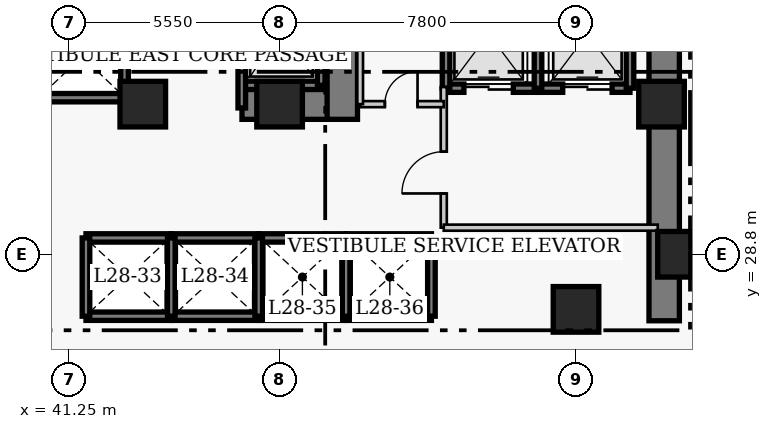
"""IFC4 building model, lengths in metres.
Left out: names, types, materials, properties, quantities, classifications, styles, units other than length and angle.
Written with IfcOpenShell. Run it as: python <this file> out.ifc"""

import sys

from ifc_helpers import new_model, si_unit, direction, frame, frame_2d, origin, origin_2d, place, context, subcontext, project, spatial, rectangle, extrude, element, fill, save


model = new_model("IFC4")
c1 = context("Model", 3, precision=1e-05, world=origin(), true_north=direction((0.0, 1.0)))
c2 = subcontext(c1, "Body", "Model", "MODEL_VIEW")
j1 = project(units=[si_unit("LENGTHUNIT", "METRE"), si_unit("PLANEANGLEUNIT", "RADIAN")], contexts=[c1])
p1 = place(None, origin())
s1 = spatial("IfcSite", under=j1, at=p1, CompositionType="ELEMENT")
p2 = place(p1, origin())
s2 = spatial("IfcBuilding", under=s1, at=p2, CompositionType="ELEMENT")
p3 = place(p2, frame((0.0, 0.0, 114.6)))
s3 = spatial("IfcBuildingStorey", under=s2, at=p3, CompositionType="ELEMENT", Elevation=114.6)
p4 = place(p3, frame((56.92, 27.05, 0.0), z_axis=(0.0, 0.0, 1.0), x_axis=(0.0, 1.0, 0.0)))
e1 = element("IfcWall", 1, at=p4, inside=s3, PredefinedType="SHEAR", context=c2, shape_type="SweptSolid", body=[
    extrude(rectangle(XDim=13.67, YDim=0.8, at=frame_2d((6.835, 0.0))), origin(), (0.0, 0.0, 1.0), 3.8),
])
p5 = place(p3, frame((45.81, 32.75, 0.0), z_axis=(0.0, 0.0, 1.0), x_axis=(1.0, 0.0, 0.0)))
e2 = element("IfcWall", 2, at=p5, inside=s3, PredefinedType="SHEAR", context=c2, shape_type="SweptSolid", body=[
    extrude(rectangle(XDim=2.64, YDim=0.8, at=frame_2d((1.32, 0.0))), origin(), (0.0, 0.0, 1.0), 3.8),
])
p6 = place(p3, frame((48.45, 32.35, 0.0), z_axis=(0.0, 0.0, 1.0), x_axis=(0.0, 1.0, 0.0)))
e3 = element("IfcWall", 3, at=p6, inside=s3, PredefinedType="SHEAR", context=c2, shape_type="SweptSolid", body=[
    extrude(rectangle(XDim=7.97, YDim=0.8, at=frame_2d((3.985, 0.0))), origin(), (0.0, 0.0, 1.0), 3.8),
])
p7 = place(p6, frame((5.85, 0.0, 0.0)))
e4 = element("IfcOpeningElement", 4, at=p7, cuts=e3, PredefinedType="OPENING", context=c2, shape_type="SweptSolid", body=[
    extrude(rectangle(XDim=1.1, YDim=2.15, at=frame_2d((0.55, 1.075))), frame((0.0, 0.41, 0.0), z_axis=(0.0, -1.0, 0.0), x_axis=(1.0, 0.0, 0.0)), (0.0, 0.0, 1.0), 0.82),
])
for number, where, z_axis, x_axis in (
    (5, (57.35, 28.8, 0.0), (0.0, 0.0, 1.0), (1.0, 0.0, 0.0)),
    (6, (43.2, 32.75, 0.0), (0.0, 0.0, 1.0), (1.0, 0.0, 0.0)),
    (7, (46.8, 32.75, 0.0), (0.0, 0.0, 1.0), (1.0, 0.0, 0.0)),
    (8, (54.6, 27.35, 0.0), (0.0, 0.0, 1.0), (1.0, 0.0, 0.0)),
    (9, (56.85, 32.75, 0.0), (0.0, 0.0, 1.0), (1.0, 0.0, 0.0)),
):
    element("IfcColumn", number, at=place(p3, frame(where, z_axis=z_axis, x_axis=x_axis)), inside=s3, PredefinedType="COLUMN", context=c2, shape_type="SweptSolid", body=[
        extrude(rectangle(XDim=1.2, YDim=1.2, at=origin_2d()), origin(), (0.0, 0.0, 1.0), 3.8),
    ])
for number, where, z_axis, x_axis in (
    (10, (41.705, 29.23, 0.0), (0.0, 0.0, 1.0), (1.0, 0.0, 0.0)),
    (11, (41.705, 27.17, 0.0), (0.0, 0.0, 1.0), (1.0, 0.0, 0.0)),
):
    element("IfcWall", number, at=place(p3, frame(where, z_axis=z_axis, x_axis=x_axis)), inside=s3, PredefinedType="SHEAR", context=c2, shape_type="SweptSolid", body=[
        extrude(rectangle(XDim=2.245, YDim=0.22, at=frame_2d((1.123, 0.0))), origin(), (0.0, 0.0, 1.0), 3.8),
    ])
p8 = place(p3, frame((41.705, 27.17, 0.0), z_axis=(0.0, 0.0, 1.0), x_axis=(0.0, 1.0, 0.0)))
e12 = element("IfcWall", 12, at=p8, inside=s3, PredefinedType="SHEAR", context=c2, shape_type="SweptSolid", body=[
    extrude(rectangle(XDim=2.06, YDim=0.2, at=frame_2d((1.03, 0.0))), origin(), (0.0, 0.0, 1.0), 3.8),
])
for number, where, z_axis, x_axis in (
    (13, (43.95, 29.23, 0.0), (0.0, 0.0, 1.0), (1.0, 0.0, 0.0)),
    (14, (43.95, 27.17, 0.0), (0.0, 0.0, 1.0), (1.0, 0.0, 0.0)),
):
    element("IfcWall", number, at=place(p3, frame(where, z_axis=z_axis, x_axis=x_axis)), inside=s3, PredefinedType="SHEAR", context=c2, shape_type="SweptSolid", body=[
        extrude(rectangle(XDim=2.3, YDim=0.22, at=frame_2d((1.15, 0.0))), origin(), (0.0, 0.0, 1.0), 3.8),
    ])
p9 = place(p3, frame((43.95, 27.17, 0.0), z_axis=(0.0, 0.0, 1.0), x_axis=(0.0, 1.0, 0.0)))
e15 = element("IfcWall", 15, at=p9, inside=s3, PredefinedType="SHEAR", context=c2, shape_type="SweptSolid", body=[
    extrude(rectangle(XDim=2.06, YDim=0.2, at=frame_2d((1.03, 0.0))), origin(), (0.0, 0.0, 1.0), 3.8),
])
for number, where, z_axis, x_axis in (
    (16, (46.25, 29.23, 0.0), (0.0, 0.0, 1.0), (1.0, 0.0, 0.0)),
    (17, (46.25, 27.17, 0.0), (0.0, 0.0, 1.0), (1.0, 0.0, 0.0)),
):
    element("IfcWall", number, at=place(p3, frame(where, z_axis=z_axis, x_axis=x_axis)), inside=s3, PredefinedType="SHEAR", context=c2, shape_type="SweptSolid", body=[
        extrude(rectangle(XDim=2.3, YDim=0.22, at=frame_2d((1.15, 0.0))), origin(), (0.0, 0.0, 1.0), 3.8),
    ])
p10 = place(p3, frame((46.25, 27.17, 0.0), z_axis=(0.0, 0.0, 1.0), x_axis=(0.0, 1.0, 0.0)))
e18 = element("IfcWall", 18, at=p10, inside=s3, PredefinedType="SHEAR", context=c2, shape_type="SweptSolid", body=[
    extrude(rectangle(XDim=2.06, YDim=0.2, at=frame_2d((1.03, 0.0))), origin(), (0.0, 0.0, 1.0), 3.8),
])
for number, where, z_axis, x_axis in (
    (19, (48.55, 29.23, 0.0), (0.0, 0.0, 1.0), (1.0, 0.0, 0.0)),
    (20, (48.55, 27.17, 0.0), (0.0, 0.0, 1.0), (1.0, 0.0, 0.0)),
):
    element("IfcWall", number, at=place(p3, frame(where, z_axis=z_axis, x_axis=x_axis)), inside=s3, PredefinedType="SHEAR", context=c2, shape_type="SweptSolid", body=[
        extrude(rectangle(XDim=2.245, YDim=0.22, at=frame_2d((1.123, 0.0))), origin(), (0.0, 0.0, 1.0), 3.8),
    ])
for number, where, z_axis, x_axis in (
    (21, (48.55, 27.17, 0.0), (0.0, 0.0, 1.0), (0.0, 1.0, 0.0)),
    (22, (50.795, 27.17, 0.0), (0.0, 0.0, 1.0), (0.0, 1.0, 0.0)),
):
    element("IfcWall", number, at=place(p3, frame(where, z_axis=z_axis, x_axis=x_axis)), inside=s3, PredefinedType="SHEAR", context=c2, shape_type="SweptSolid", body=[
        extrude(rectangle(XDim=2.06, YDim=0.2, at=frame_2d((1.03, 0.0))), origin(), (0.0, 0.0, 1.0), 3.8),
    ])
p11 = place(p3, frame((40.4, 32.92, 0.0), z_axis=(0.0, 0.0, 1.0), x_axis=(1.0, 0.0, 0.0)))
e23 = element("IfcWall", 23, at=p11, inside=s3, PredefinedType="SHEAR", context=c2, shape_type="SweptSolid", body=[
    extrude(rectangle(XDim=2.32, YDim=0.22, at=frame_2d((1.16, 0.0))), origin(), (0.0, 0.0, 1.0), 3.8),
])
p12 = place(p3, frame((42.72, 32.92, 0.0), z_axis=(0.0, 0.0, 1.0), x_axis=(0.0, 1.0, 0.0)))
e24 = element("IfcWall", 24, at=p12, inside=s3, PredefinedType="SHEAR", context=c2, shape_type="SweptSolid", body=[
    extrude(rectangle(XDim=2.16, YDim=0.2, at=frame_2d((1.08, 0.0))), origin(), (0.0, 0.0, 1.0), 3.8),
])
p13 = place(p3, frame((51.18, 33.17, 0.0), z_axis=(0.0, 0.0, 1.0), x_axis=(1.0, 0.0, 0.0)))
e25 = element("IfcWall", 25, at=p13, inside=s3, PredefinedType="SHEAR", context=c2, shape_type="SweptSolid", body=[
    extrude(rectangle(XDim=2.42, YDim=0.22, at=frame_2d((1.21, 0.0))), origin(), (0.0, 0.0, 1.0), 3.8),
])
p14 = place(p13, frame((0.47, 0.0, 0.0)))
e26 = element("IfcOpeningElement", 26, at=p14, cuts=e25, PredefinedType="OPENING", context=c2, shape_type="SweptSolid", body=[
    extrude(rectangle(XDim=1.3, YDim=2.15, at=frame_2d((0.65, 1.075))), frame((0.0, 0.12, 0.0), z_axis=(0.0, -1.0, 0.0), x_axis=(1.0, 0.0, 0.0)), (0.0, 0.0, 1.0), 0.24),
])
p15 = place(p3, frame((51.18, 33.17, 0.0), z_axis=(0.0, 0.0, 1.0), x_axis=(0.0, 1.0, 0.0)))
e27 = element("IfcWall", 27, at=p15, inside=s3, PredefinedType="SHEAR", context=c2, shape_type="SweptSolid", body=[
    extrude(rectangle(XDim=2.86, YDim=0.2, at=frame_2d((1.43, 0.0))), origin(), (0.0, 0.0, 1.0), 3.8),
])
p16 = place(p3, frame((53.6, 33.17, 0.0), z_axis=(0.0, 0.0, 1.0), x_axis=(1.0, 0.0, 0.0)))
e28 = element("IfcWall", 28, at=p16, inside=s3, PredefinedType="SHEAR", context=c2, shape_type="SweptSolid", body=[
    extrude(rectangle(XDim=2.42, YDim=0.22, at=frame_2d((1.21, 0.0))), origin(), (0.0, 0.0, 1.0), 3.8),
])
p17 = place(p16, frame((0.65, 0.0, 0.0)))
e29 = element("IfcOpeningElement", 29, at=p17, cuts=e28, PredefinedType="OPENING", context=c2, shape_type="SweptSolid", body=[
    extrude(rectangle(XDim=1.3, YDim=2.15, at=frame_2d((0.65, 1.075))), frame((0.0, 0.12, 0.0), z_axis=(0.0, -1.0, 0.0), x_axis=(1.0, 0.0, 0.0)), (0.0, 0.0, 1.0), 0.24),
])
for number, where, z_axis, x_axis in (
    (30, (53.6, 33.17, 0.0), (0.0, 0.0, 1.0), (0.0, 1.0, 0.0)),
    (31, (56.02, 33.17, 0.0), (0.0, 0.0, 1.0), (0.0, 1.0, 0.0)),
):
    element("IfcWall", number, at=place(p3, frame(where, z_axis=z_axis, x_axis=x_axis)), inside=s3, PredefinedType="SHEAR", context=c2, shape_type="SweptSolid", body=[
        extrude(rectangle(XDim=2.86, YDim=0.2, at=frame_2d((1.43, 0.0))), origin(), (0.0, 0.0, 1.0), 3.8),
    ])
p18 = place(p3, frame((45.805, 33.245, 0.0), z_axis=(0.0, 0.0, 1.0), x_axis=(1.0, 0.0, 0.0)))
e32 = element("IfcWall", 32, at=p18, inside=s3, PredefinedType="SHEAR", context=c2, shape_type="SweptSolid", body=[
    extrude(rectangle(XDim=2.09, YDim=0.22, at=frame_2d((1.045, 0.0))), origin(), (0.0, 0.0, 1.0), 3.8),
])
p19 = place(p3, frame((45.805, 32.65, 0.0), z_axis=(0.0, 0.0, 1.0), x_axis=(0.0, 1.0, 0.0)))
e33 = element("IfcWall", 33, at=p19, inside=s3, PredefinedType="SHEAR", context=c2, shape_type="SweptSolid", body=[
    extrude(rectangle(XDim=3.505, YDim=0.2, at=frame_2d((1.752, 0.0))), origin(), (0.0, 0.0, 1.0), 3.8),
])
p20 = place(p3, frame((47.895, 33.245, 0.0), z_axis=(0.0, 0.0, 1.0), x_axis=(0.0, 1.0, 0.0)))
e34 = element("IfcWall", 34, at=p20, inside=s3, PredefinedType="SHEAR", context=c2, shape_type="SweptSolid", body=[
    extrude(rectangle(XDim=2.91, YDim=0.2, at=frame_2d((1.455, 0.0))), origin(), (0.0, 0.0, 1.0), 3.8),
])
p21 = place(p3, frame((51.12, 29.5, 0.0), z_axis=(0.0, 0.0, 1.0), x_axis=(0.0, 1.0, 0.0)))
e35 = element("IfcWall", 35, at=p21, inside=s3, PredefinedType="PARTITIONING", context=c2, shape_type="SweptSolid", body=[
    extrude(rectangle(XDim=3.7, YDim=0.16, at=frame_2d((1.85, 0.0))), origin(), (0.0, 0.0, 1.0), 3.54),
])
p22 = place(p21, frame((0.9, 0.0, 0.0)))
e36 = element("IfcOpeningElement", 36, at=p22, cuts=e35, PredefinedType="OPENING", context=c2, shape_type="SweptSolid", body=[
    extrude(rectangle(XDim=1.1, YDim=2.15, at=frame_2d((0.55, 1.075))), frame((0.0, 0.09, 0.0), z_axis=(0.0, -1.0, 0.0), x_axis=(1.0, 0.0, 0.0)), (0.0, 0.0, 1.0), 0.18),
])
p23 = place(p3, frame((51.12, 29.5, 0.0), z_axis=(0.0, 0.0, 1.0), x_axis=(1.0, 0.0, 0.0)))
e37 = element("IfcWall", 37, at=p23, inside=s3, PredefinedType="PARTITIONING", context=c2, shape_type="SweptSolid", body=[
    extrude(rectangle(XDim=5.63, YDim=0.16, at=frame_2d((2.815, 0.0))), origin(), (0.0, 0.0, 1.0), 3.54),
])
p24 = place(p3, frame((48.92, 32.75, 0.0), z_axis=(0.0, 0.0, 1.0), x_axis=(1.0, 0.0, 0.0)))
e38 = element("IfcWall", 38, at=p24, inside=s3, PredefinedType="PARTITIONING", context=c2, shape_type="SweptSolid", body=[
    extrude(rectangle(XDim=2.2, YDim=0.16, at=frame_2d((1.1, 0.0))), origin(), (0.0, 0.0, 1.0), 3.54),
])
p25 = place(p24, frame((0.65, 0.0, 0.0)))
e39 = element("IfcOpeningElement", 39, at=p25, cuts=e38, PredefinedType="OPENING", context=c2, shape_type="SweptSolid", body=[
    extrude(rectangle(XDim=0.86, YDim=2.05, at=frame_2d((0.43, 1.025))), frame((0.0, 0.09, 0.0), z_axis=(0.0, -1.0, 0.0), x_axis=(1.0, 0.0, 0.0)), (0.0, 0.0, 1.0), 0.18),
])
p26 = place(p3, frame((48.92, 32.75, 0.0), z_axis=(0.0, 0.0, 1.0), x_axis=(0.0, 1.0, 0.0)))
e40 = element("IfcWall", 40, at=p26, inside=s3, PredefinedType="PARTITIONING", context=c2, shape_type="SweptSolid", body=[
    extrude(rectangle(XDim=3.62, YDim=0.15, at=frame_2d((1.81, 0.0))), origin(), (0.0, 0.0, 1.0), 3.54),
])
p27 = place(p14, origin())
e41 = element("IfcDoor", 41, at=p27, inside=s3, OperationType="DOUBLE_DOOR_SLIDING", PredefinedType="DOOR", context=c2, shape_type="SweptSolid", body=[
    extrude(rectangle(XDim=1.3, YDim=2.15, at=frame_2d((0.65, 1.075))), frame((0.0, 0.025, 0.0), z_axis=(0.0, -1.0, 0.0), x_axis=(1.0, 0.0, 0.0)), (0.0, 0.0, 1.0), 0.05),
])
fill(e26, e41)
p28 = place(p17, origin())
e42 = element("IfcDoor", 42, at=p28, inside=s3, OperationType="DOUBLE_DOOR_SLIDING", PredefinedType="DOOR", context=c2, shape_type="SweptSolid", body=[
    extrude(rectangle(XDim=1.3, YDim=2.15, at=frame_2d((0.65, 1.075))), frame((0.0, 0.025, 0.0), z_axis=(0.0, -1.0, 0.0), x_axis=(1.0, 0.0, 0.0)), (0.0, 0.0, 1.0), 0.05),
])
fill(e29, e42)
p29 = place(p22, origin())
e43 = element("IfcDoor", 43, at=p29, inside=s3, OperationType="SINGLE_SWING_LEFT", PredefinedType="DOOR", context=c2, shape_type="SweptSolid", body=[
    extrude(rectangle(XDim=1.1, YDim=2.15, at=frame_2d((0.55, 1.075))), frame((0.0, 0.025, 0.0), z_axis=(0.0, -1.0, 0.0), x_axis=(1.0, 0.0, 0.0)), (0.0, 0.0, 1.0), 0.05),
])
fill(e36, e43)
p30 = place(p25, origin())
e44 = element("IfcDoor", 44, at=p30, inside=s3, OperationType="SINGLE_SWING_RIGHT", PredefinedType="DOOR", context=c2, shape_type="SweptSolid", body=[
    extrude(rectangle(XDim=0.86, YDim=2.05, at=frame_2d((0.43, 1.025))), frame((0.0, 0.025, 0.0), z_axis=(0.0, -1.0, 0.0), x_axis=(1.0, 0.0, 0.0)), (0.0, 0.0, 1.0), 0.05),
])
fill(e39, e44)
save(model, sys.argv[1])
